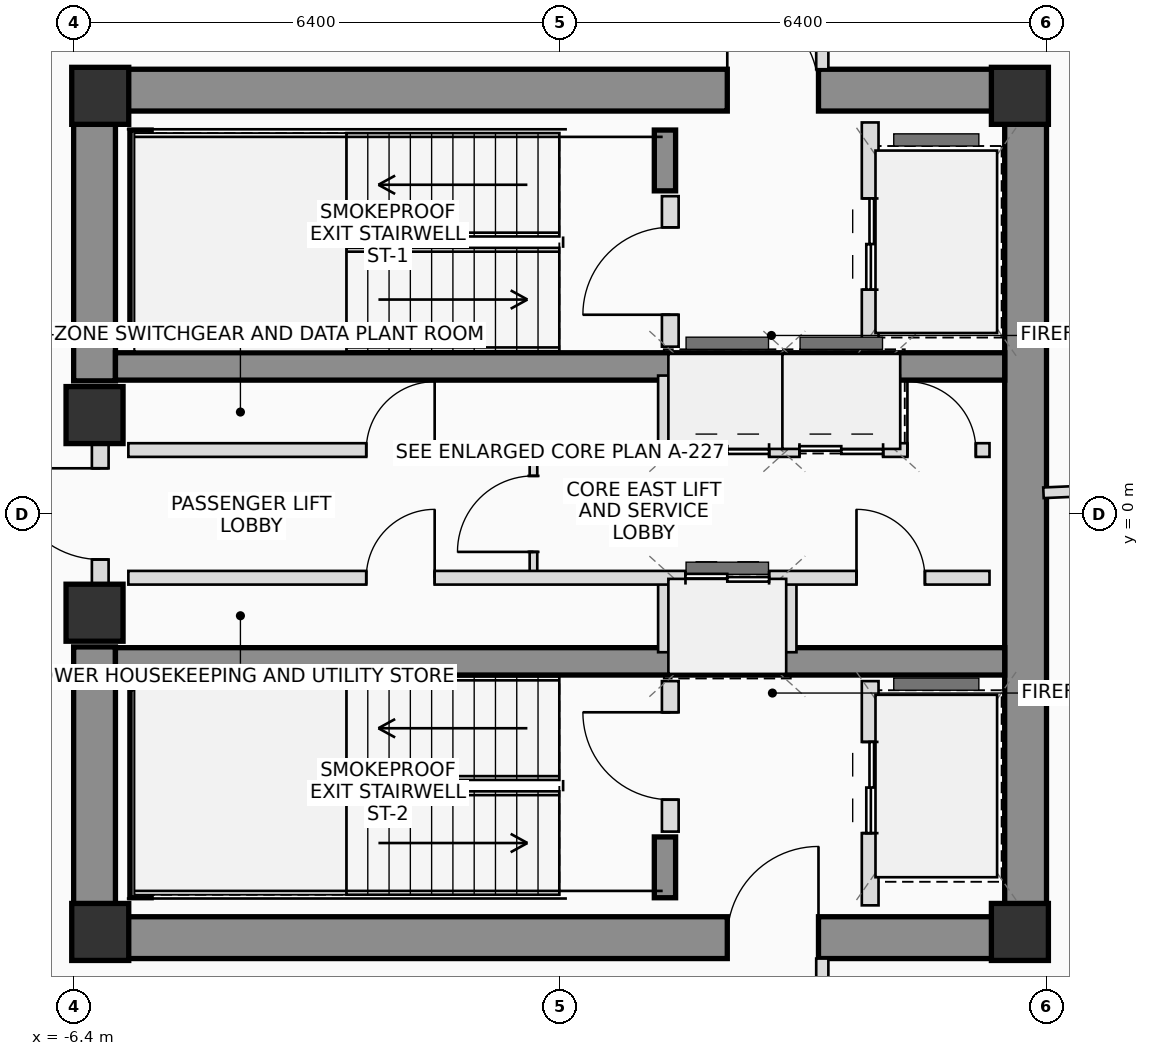
"""IFC4 building model, lengths in metres.
Left out: names, types, materials, properties, quantities, classifications, styles, units other than length and angle.
Written with IfcOpenShell. Run it as: python <this file> out.ifc"""

import sys

from ifc_helpers import new_model, si_unit, direction, frame, frame_2d, origin, origin_2d, place, context, subcontext, project, spatial, rectangle, extrude, source, transform, mapped, element, fill, save


model = new_model("IFC4")
c1 = context("Model", 3, precision=1e-05, world=origin(), true_north=direction((0.0, 1.0)))
c2 = subcontext(c1, "Body", "Model", "MODEL_VIEW")
j1 = project(units=[si_unit("LENGTHUNIT", "METRE"), si_unit("PLANEANGLEUNIT", "RADIAN")], contexts=[c1])
p1 = place(None, origin())
s1 = spatial("IfcSite", under=j1, at=p1, CompositionType="ELEMENT")
p2 = place(p1, origin())
s2 = spatial("IfcBuilding", under=s1, at=p2, CompositionType="ELEMENT")
p3 = place(p2, frame((0.0, 0.0, 303.65)))
s3 = spatial("IfcBuildingStorey", under=s2, at=p3, CompositionType="ELEMENT", Elevation=303.65)
m1 = source(origin(), c2, "Body", "SweptSolid", [
    extrude(rectangle(XDim=0.75, YDim=0.75, at=origin_2d()), origin(), (0.0, 0.0, 1.0), 3.45),
])
for number, where, z_axis, x_axis in (
    (1, (-6.05, -5.5, 0.0), (0.0, 0.0, 1.0), (1.0, 0.0, 0.0)),
    (2, (6.05, -5.5, 0.0), (0.0, 0.0, 1.0), (1.0, 0.0, 0.0)),
    (3, (6.05, 5.5, 0.0), (0.0, 0.0, 1.0), (1.0, 0.0, 0.0)),
    (4, (-6.05, 5.5, 0.0), (0.0, 0.0, 1.0), (1.0, 0.0, 0.0)),
):
    element("IfcColumn", number, at=place(p3, frame(where, z_axis=z_axis, x_axis=x_axis)), inside=s3, PredefinedType="COLUMN", context=c2, shape_type="MappedRepresentation", body=[
        mapped(m1, transform((0.0, 0.0, 0.0), scale=1.0)),
    ])
p4 = place(p3, frame((-6.4, 5.575, 0.0), z_axis=(0.0, 0.0, 1.0), x_axis=(1.0, 0.0, 0.0)))
e5 = element("IfcWall", 5, at=p4, inside=s3, PredefinedType="SHEAR", context=c2, shape_type="SweptSolid", body=[
    extrude(rectangle(XDim=12.8, YDim=0.55, at=frame_2d((6.4, 0.0))), origin(), (0.0, 0.0, 1.0), 3.45),
])
p5 = place(p4, frame((8.6, 0.0, 0.0)))
e6 = element("IfcOpeningElement", 6, at=p5, cuts=e5, PredefinedType="OPENING", context=c2, shape_type="SweptSolid", body=[
    extrude(rectangle(XDim=1.2, YDim=2.2, at=frame_2d((0.6, 1.1))), frame((0.0, 0.285, 0.0), z_axis=(0.0, -1.0, 0.0), x_axis=(1.0, 0.0, 0.0)), (0.0, 0.0, 1.0), 0.57),
])
p6 = place(p3, frame((-6.4, -5.575, 0.0), z_axis=(0.0, 0.0, 1.0), x_axis=(1.0, 0.0, 0.0)))
e7 = element("IfcWall", 7, at=p6, inside=s3, PredefinedType="SHEAR", context=c2, shape_type="SweptSolid", body=[
    extrude(rectangle(XDim=12.8, YDim=0.55, at=frame_2d((6.4, 0.0))), origin(), (0.0, 0.0, 1.0), 3.45),
])
p7 = place(p6, frame((8.6, 0.0, 0.0)))
e8 = element("IfcOpeningElement", 8, at=p7, cuts=e7, PredefinedType="OPENING", context=c2, shape_type="SweptSolid", body=[
    extrude(rectangle(XDim=1.2, YDim=2.2, at=frame_2d((0.6, 1.1))), frame((0.0, 0.285, 0.0), z_axis=(0.0, -1.0, 0.0), x_axis=(1.0, 0.0, 0.0)), (0.0, 0.0, 1.0), 0.57),
])
p8 = place(p3, frame((6.125, -5.3, 0.0), z_axis=(0.0, 0.0, 1.0), x_axis=(0.0, 1.0, 0.0)))
e9 = element("IfcWall", 9, at=p8, inside=s3, PredefinedType="SHEAR", context=c2, shape_type="SweptSolid", body=[
    extrude(rectangle(XDim=10.6, YDim=0.55, at=frame_2d((5.3, 0.0))), origin(), (0.0, 0.0, 1.0), 3.45),
])
for number, where, z_axis, x_axis in (
    (10, (-6.125, -5.3, 0.0), (0.0, 0.0, 1.0), (0.0, 1.0, 0.0)),
    (11, (-6.125, 1.75, 0.0), (0.0, 0.0, 1.0), (0.0, 1.0, 0.0)),
):
    element("IfcWall", number, at=place(p3, frame(where, z_axis=z_axis, x_axis=x_axis)), inside=s3, PredefinedType="SHEAR", context=c2, shape_type="SweptSolid", body=[
        extrude(rectangle(XDim=3.55, YDim=0.55, at=frame_2d((1.775, 0.0))), origin(), (0.0, 0.0, 1.0), 3.45),
    ])
for number, where, z_axis, x_axis in (
    (12, (-5.85, 1.94, 0.0), (0.0, 0.0, 1.0), (1.0, 0.0, 0.0)),
    (13, (-5.85, -1.94, 0.0), (0.0, 0.0, 1.0), (1.0, 0.0, 0.0)),
):
    element("IfcWall", number, at=place(p3, frame(where, z_axis=z_axis, x_axis=x_axis)), inside=s3, PredefinedType="SHEAR", context=c2, shape_type="SweptSolid", body=[
        extrude(rectangle(XDim=11.7, YDim=0.36, at=frame_2d((5.85, 0.0))), origin(), (0.0, 0.0, 1.0), 3.45),
    ])
p9 = place(p3, frame((-5.52, 2.3, 0.0), z_axis=(0.0, 0.0, 1.0), x_axis=(0.0, 1.0, 0.0)))
e14 = element("IfcWall", 14, at=p9, inside=s3, PredefinedType="SHEAR", context=c2, shape_type="SweptSolid", body=[
    extrude(rectangle(XDim=2.75, YDim=0.28, at=frame_2d((1.375, 0.0))), origin(), (0.0, 0.0, 1.0), 3.45),
])
p10 = place(p3, frame((1.38, 4.25, 0.0), z_axis=(0.0, 0.0, 1.0), x_axis=(0.0, 1.0, 0.0)))
e15 = element("IfcWall", 15, at=p10, inside=s3, PredefinedType="SHEAR", context=c2, shape_type="SweptSolid", body=[
    extrude(rectangle(XDim=0.8, YDim=0.28, at=frame_2d((0.4, 0.0))), origin(), (0.0, 0.0, 1.0), 3.45),
])
p11 = place(p3, frame((-5.52, -5.05, 0.0), z_axis=(0.0, 0.0, 1.0), x_axis=(0.0, 1.0, 0.0)))
e16 = element("IfcWall", 16, at=p11, inside=s3, PredefinedType="SHEAR", context=c2, shape_type="SweptSolid", body=[
    extrude(rectangle(XDim=2.75, YDim=0.28, at=frame_2d((1.375, 0.0))), origin(), (0.0, 0.0, 1.0), 3.45),
])
p12 = place(p3, frame((1.38, -5.05, 0.0), z_axis=(0.0, 0.0, 1.0), x_axis=(0.0, 1.0, 0.0)))
e17 = element("IfcWall", 17, at=p12, inside=s3, PredefinedType="SHEAR", context=c2, shape_type="SweptSolid", body=[
    extrude(rectangle(XDim=0.8, YDim=0.28, at=frame_2d((0.4, 0.0))), origin(), (0.0, 0.0, 1.0), 3.45),
])
for number, where, z_axis, x_axis in (
    (18, (-6.125, -1.3, 0.0), (0.0, 0.0, 1.0), (1.0, 0.0, 0.0)),
    (19, (-6.125, 1.3, 0.0), (0.0, 0.0, 1.0), (1.0, 0.0, 0.0)),
):
    element("IfcColumn", number, at=place(p3, frame(where, z_axis=z_axis, x_axis=x_axis)), inside=s3, PredefinedType="COLUMN", context=c2, shape_type="MappedRepresentation", body=[
        mapped(m1, transform((0.0, 0.0, 0.0), scale=1.0)),
    ])
p13 = place(p3, frame((-6.05, -0.95, 0.0), z_axis=(0.0, 0.0, 1.0), x_axis=(0.0, 1.0, 0.0)))
e20 = element("IfcWall", 20, at=p13, inside=s3, PredefinedType="PLUMBINGWALL", context=c2, shape_type="SweptSolid", body=[
    extrude(rectangle(XDim=1.9, YDim=0.22, at=frame_2d((0.95, 0.0))), origin(), (0.0, 0.0, 1.0), 2.23),
])
p14 = place(p13, frame((0.35, 0.0, 0.0)))
e21 = element("IfcOpeningElement", 21, at=p14, cuts=e20, PredefinedType="OPENING", context=c2, shape_type="SweptSolid", body=[
    extrude(rectangle(XDim=1.2, YDim=2.2, at=frame_2d((0.6, 1.1))), frame((0.0, 0.12, 0.0), z_axis=(0.0, -1.0, 0.0), x_axis=(1.0, 0.0, 0.0)), (0.0, 0.0, 1.0), 0.24),
])
p15 = place(p3, frame((1.45, 2.2, 0.0), z_axis=(0.0, 0.0, 1.0), x_axis=(0.0, 1.0, 0.0)))
e22 = element("IfcWall", 22, at=p15, inside=s3, PredefinedType="PLUMBINGWALL", context=c2, shape_type="SweptSolid", body=[
    extrude(rectangle(XDim=1.98, YDim=0.22, at=frame_2d((0.99, 0.0))), origin(), (0.0, 0.0, 1.0), 3.25),
])
p16 = place(p15, frame((0.42, 0.0, 0.0)))
e23 = element("IfcOpeningElement", 23, at=p16, cuts=e22, PredefinedType="OPENING", context=c2, shape_type="SweptSolid", body=[
    extrude(rectangle(XDim=1.15, YDim=2.15, at=frame_2d((0.575, 1.075))), frame((0.0, 0.12, 0.0), z_axis=(0.0, -1.0, 0.0), x_axis=(1.0, 0.0, 0.0)), (0.0, 0.0, 1.0), 0.24),
])
p17 = place(p3, frame((4.08, 2.2, 0.0), z_axis=(0.0, 0.0, 1.0), x_axis=(0.0, 1.0, 0.0)))
e24 = element("IfcWall", 24, at=p17, inside=s3, PredefinedType="PLUMBINGWALL", context=c2, shape_type="SweptSolid", body=[
    extrude(rectangle(XDim=2.95, YDim=0.22, at=frame_2d((1.475, 0.0))), origin(), (0.0, 0.0, 1.0), 3.25),
])
p18 = place(p17, frame((0.75, 0.0, 0.0)))
e25 = element("IfcOpeningElement", 25, at=p18, cuts=e24, PredefinedType="OPENING", context=c2, shape_type="SweptSolid", body=[
    extrude(rectangle(XDim=1.2, YDim=2.25, at=frame_2d((0.6, 1.125))), frame((0.0, 0.12, 0.0), z_axis=(0.0, -1.0, 0.0), x_axis=(1.0, 0.0, 0.0)), (0.0, 0.0, 1.0), 0.24),
])
p19 = place(p3, frame((1.45, -4.18, 0.0), z_axis=(0.0, 0.0, 1.0), x_axis=(0.0, 1.0, 0.0)))
e26 = element("IfcWall", 26, at=p19, inside=s3, PredefinedType="PLUMBINGWALL", context=c2, shape_type="SweptSolid", body=[
    extrude(rectangle(XDim=1.98, YDim=0.22, at=frame_2d((0.99, 0.0))), origin(), (0.0, 0.0, 1.0), 3.25),
])
p20 = place(p19, frame((0.42, 0.0, 0.0)))
e27 = element("IfcOpeningElement", 27, at=p20, cuts=e26, PredefinedType="OPENING", context=c2, shape_type="SweptSolid", body=[
    extrude(rectangle(XDim=1.15, YDim=2.15, at=frame_2d((0.575, 1.075))), frame((0.0, 0.12, 0.0), z_axis=(0.0, -1.0, 0.0), x_axis=(1.0, 0.0, 0.0)), (0.0, 0.0, 1.0), 0.24),
])
p21 = place(p3, frame((4.08, -5.15, 0.0), z_axis=(0.0, 0.0, 1.0), x_axis=(0.0, 1.0, 0.0)))
e28 = element("IfcWall", 28, at=p21, inside=s3, PredefinedType="PLUMBINGWALL", context=c2, shape_type="SweptSolid", body=[
    extrude(rectangle(XDim=2.95, YDim=0.22, at=frame_2d((1.475, 0.0))), origin(), (0.0, 0.0, 1.0), 3.25),
])
p22 = place(p21, frame((0.95, 0.0, 0.0)))
e29 = element("IfcOpeningElement", 29, at=p22, cuts=e28, PredefinedType="OPENING", context=c2, shape_type="SweptSolid", body=[
    extrude(rectangle(XDim=1.2, YDim=2.25, at=frame_2d((0.6, 1.125))), frame((0.0, 0.12, 0.0), z_axis=(0.0, -1.0, 0.0), x_axis=(1.0, 0.0, 0.0)), (0.0, 0.0, 1.0), 0.24),
])
p23 = place(p3, frame((-0.35, -0.84, 0.0), z_axis=(0.0, 0.0, 1.0), x_axis=(0.0, 1.0, 0.0)))
e30 = element("IfcWall", 30, at=p23, inside=s3, PredefinedType="PARTITIONING", context=c2, shape_type="SweptSolid", body=[
    extrude(rectangle(XDim=1.68, YDim=0.1, at=frame_2d((0.84, 0.0))), origin(), (0.0, 0.0, 1.0), 3.25),
])
p24 = place(p23, frame((0.34, 0.0, 0.0)))
e31 = element("IfcOpeningElement", 31, at=p24, cuts=e30, PredefinedType="OPENING", context=c2, shape_type="SweptSolid", body=[
    extrude(rectangle(XDim=1.0, YDim=2.25, at=frame_2d((0.5, 1.125))), frame((0.0, 0.06, 0.0), z_axis=(0.0, -1.0, 0.0), x_axis=(1.0, 0.0, 0.0)), (0.0, 0.0, 1.0), 0.12),
])
for number, where, z_axis, x_axis in (
    (32, (1.38, 0.84, 0.0), (0.0, 0.0, 1.0), (0.0, 1.0, 0.0)),
    (33, (1.38, -1.82, 0.0), (0.0, 0.0, 1.0), (0.0, 1.0, 0.0)),
    (34, (3.02, 0.84, 0.0), (0.0, 0.0, 1.0), (0.0, 1.0, 0.0)),
    (35, (4.38, 0.84, 0.0), (0.0, 0.0, 1.0), (0.0, 1.0, 0.0)),
    (36, (3.02, -1.82, 0.0), (0.0, 0.0, 1.0), (0.0, 1.0, 0.0)),
):
    element("IfcWall", number, at=place(p3, frame(where, z_axis=z_axis, x_axis=x_axis)), inside=s3, PredefinedType="PLUMBINGWALL", context=c2, shape_type="SweptSolid", body=[
        extrude(rectangle(XDim=0.98, YDim=0.18, at=frame_2d((0.49, 0.0))), origin(), (0.0, 0.0, 1.0), 3.25),
    ])
p25 = place(p3, frame((-5.68, 0.84, 0.0), z_axis=(0.0, 0.0, 1.0), x_axis=(1.0, 0.0, 0.0)))
e37 = element("IfcWall", 37, at=p25, inside=s3, PredefinedType="PLUMBINGWALL", context=c2, shape_type="SweptSolid", body=[
    extrude(rectangle(XDim=11.33, YDim=0.18, at=frame_2d((5.665, 0.0))), origin(), (0.0, 0.0, 1.0), 3.25),
])
p26 = place(p25, frame((3.13, 0.0, 0.0)))
e38 = element("IfcOpeningElement", 38, at=p26, cuts=e37, PredefinedType="OPENING", context=c2, shape_type="SweptSolid", body=[
    extrude(rectangle(XDim=0.9, YDim=2.05, at=frame_2d((0.45, 1.025))), frame((0.0, 0.1, 0.0), z_axis=(0.0, -1.0, 0.0), x_axis=(1.0, 0.0, 0.0)), (0.0, 0.0, 1.0), 0.2),
])
p27 = place(p25, frame((7.33, 0.0, 0.0)))
e39 = element("IfcOpeningElement", 39, at=p27, cuts=e37, PredefinedType="OPENING", context=c2, shape_type="SweptSolid", body=[
    extrude(rectangle(XDim=1.1, YDim=2.2, at=frame_2d((0.55, 1.1))), frame((0.0, 0.1, 0.0), z_axis=(0.0, -1.0, 0.0), x_axis=(1.0, 0.0, 0.0)), (0.0, 0.0, 1.0), 0.2),
])
p28 = place(p25, frame((8.83, 0.0, 0.0)))
e40 = element("IfcOpeningElement", 40, at=p28, cuts=e37, PredefinedType="OPENING", context=c2, shape_type="SweptSolid", body=[
    extrude(rectangle(XDim=1.1, YDim=2.2, at=frame_2d((0.55, 1.1))), frame((0.0, 0.1, 0.0), z_axis=(0.0, -1.0, 0.0), x_axis=(1.0, 0.0, 0.0)), (0.0, 0.0, 1.0), 0.2),
])
p29 = place(p25, frame((10.25, 0.0, 0.0)))
e41 = element("IfcOpeningElement", 41, at=p29, cuts=e37, PredefinedType="OPENING", context=c2, shape_type="SweptSolid", body=[
    extrude(rectangle(XDim=0.9, YDim=2.05, at=frame_2d((0.45, 1.025))), frame((0.0, 0.1, 0.0), z_axis=(0.0, -1.0, 0.0), x_axis=(1.0, 0.0, 0.0)), (0.0, 0.0, 1.0), 0.2),
])
p30 = place(p3, frame((-5.68, -0.84, 0.0), z_axis=(0.0, 0.0, 1.0), x_axis=(1.0, 0.0, 0.0)))
e42 = element("IfcWall", 42, at=p30, inside=s3, PredefinedType="PLUMBINGWALL", context=c2, shape_type="SweptSolid", body=[
    extrude(rectangle(XDim=11.33, YDim=0.18, at=frame_2d((5.665, 0.0))), origin(), (0.0, 0.0, 1.0), 3.25),
])
p31 = place(p30, frame((3.13, 0.0, 0.0)))
e43 = element("IfcOpeningElement", 43, at=p31, cuts=e42, PredefinedType="OPENING", context=c2, shape_type="SweptSolid", body=[
    extrude(rectangle(XDim=0.9, YDim=2.05, at=frame_2d((0.45, 1.025))), frame((0.0, 0.1, 0.0), z_axis=(0.0, -1.0, 0.0), x_axis=(1.0, 0.0, 0.0)), (0.0, 0.0, 1.0), 0.2),
])
p32 = place(p30, frame((7.33, 0.0, 0.0)))
e44 = element("IfcOpeningElement", 44, at=p32, cuts=e42, PredefinedType="OPENING", context=c2, shape_type="SweptSolid", body=[
    extrude(rectangle(XDim=1.1, YDim=2.2, at=frame_2d((0.55, 1.1))), frame((0.0, 0.1, 0.0), z_axis=(0.0, -1.0, 0.0), x_axis=(1.0, 0.0, 0.0)), (0.0, 0.0, 1.0), 0.2),
])
p33 = place(p30, frame((9.58, 0.0, 0.0)))
e45 = element("IfcOpeningElement", 45, at=p33, cuts=e42, PredefinedType="OPENING", context=c2, shape_type="SweptSolid", body=[
    extrude(rectangle(XDim=0.9, YDim=2.05, at=frame_2d((0.45, 1.025))), frame((0.0, 0.1, 0.0), z_axis=(0.0, -1.0, 0.0), x_axis=(1.0, 0.0, 0.0)), (0.0, 0.0, 1.0), 0.2),
])
p34 = place(p3, frame((3.45, 7.425, 0.0), z_axis=(0.0, 0.0, 1.0), x_axis=(0.0, -1.0, 0.0)))
e46 = element("IfcWall", 46, at=p34, inside=s3, PredefinedType="PARTITIONING", context=c2, shape_type="SweptSolid", body=[
    extrude(rectangle(XDim=1.575, YDim=0.16, at=frame_2d((0.787, 0.0))), origin(), (0.0, 0.0, 1.0), 2.855),
])
p35 = place(p34, frame((0.287, 0.0, 0.0)))
e47 = element("IfcOpeningElement", 47, at=p35, cuts=e46, PredefinedType="OPENING", context=c2, shape_type="SweptSolid", body=[
    extrude(rectangle(XDim=1.0, YDim=2.25, at=frame_2d((0.5, 1.125))), frame((0.0, 0.09, 0.0), z_axis=(0.0, -1.0, 0.0), x_axis=(1.0, 0.0, 0.0)), (0.0, 0.0, 1.0), 0.18),
])
p36 = place(p3, frame((3.45, -5.85, 0.0), z_axis=(0.0, 0.0, 1.0), x_axis=(0.0, -1.0, 0.0)))
e48 = element("IfcWall", 48, at=p36, inside=s3, PredefinedType="PARTITIONING", context=c2, shape_type="SweptSolid", body=[
    extrude(rectangle(XDim=1.575, YDim=0.16, at=frame_2d((0.787, 0.0))), origin(), (0.0, 0.0, 1.0), 2.855),
])
p37 = place(p36, frame((0.287, 0.0, 0.0)))
e49 = element("IfcOpeningElement", 49, at=p37, cuts=e48, PredefinedType="OPENING", context=c2, shape_type="SweptSolid", body=[
    extrude(rectangle(XDim=1.0, YDim=2.25, at=frame_2d((0.5, 1.125))), frame((0.0, 0.09, 0.0), z_axis=(0.0, -1.0, 0.0), x_axis=(1.0, 0.0, 0.0)), (0.0, 0.0, 1.0), 0.18),
])
p38 = place(p3, frame((6.36, 0.278, 0.0), z_axis=(0.0, 0.0, 1.0), x_axis=(0.999047623791, 0.043633076864, 0.0)))
e50 = element("IfcWall", 50, at=p38, inside=s3, PredefinedType="PARTITIONING", context=c2, shape_type="SweptSolid", body=[
    extrude(rectangle(XDim=13.524, YDim=0.14, at=frame_2d((6.762, 0.0))), origin(), (0.0, 0.0, 1.0), 2.815),
])
p39 = place(p5, origin())
e51 = element("IfcDoor", 51, at=p39, inside=s3, OperationType="SINGLE_SWING_LEFT", PredefinedType="DOOR", context=c2, shape_type="SweptSolid", body=[
    extrude(rectangle(XDim=1.2, YDim=2.2, at=frame_2d((0.6, 1.1))), frame((0.0, 0.025, 0.0), z_axis=(0.0, -1.0, 0.0), x_axis=(1.0, 0.0, 0.0)), (0.0, 0.0, 1.0), 0.05),
])
fill(e6, e51)
p40 = place(p7, origin())
e52 = element("IfcDoor", 52, at=p40, inside=s3, OperationType="SINGLE_SWING_RIGHT", PredefinedType="DOOR", context=c2, shape_type="SweptSolid", body=[
    extrude(rectangle(XDim=1.2, YDim=2.2, at=frame_2d((0.6, 1.1))), frame((0.0, 0.025, 0.0), z_axis=(0.0, -1.0, 0.0), x_axis=(1.0, 0.0, 0.0)), (0.0, 0.0, 1.0), 0.05),
])
fill(e8, e52)
p41 = place(p14, origin())
e53 = element("IfcDoor", 53, at=p41, inside=s3, OperationType="SINGLE_SWING_RIGHT", PredefinedType="DOOR", context=c2, shape_type="SweptSolid", body=[
    extrude(rectangle(XDim=1.2, YDim=2.2, at=frame_2d((0.6, 1.1))), frame((0.0, 0.025, 0.0), z_axis=(0.0, -1.0, 0.0), x_axis=(1.0, 0.0, 0.0)), (0.0, 0.0, 1.0), 0.05),
])
fill(e21, e53)
p42 = place(p16, origin())
e54 = element("IfcDoor", 54, at=p42, inside=s3, OperationType="SINGLE_SWING_LEFT", PredefinedType="DOOR", context=c2, shape_type="SweptSolid", body=[
    extrude(rectangle(XDim=1.15, YDim=2.15, at=frame_2d((0.575, 1.075))), frame((0.0, 0.025, 0.0), z_axis=(0.0, -1.0, 0.0), x_axis=(1.0, 0.0, 0.0)), (0.0, 0.0, 1.0), 0.05),
])
fill(e23, e54)
p43 = place(p18, origin())
e55 = element("IfcDoor", 55, at=p43, inside=s3, OperationType="DOUBLE_DOOR_SLIDING", PredefinedType="DOOR", context=c2, shape_type="SweptSolid", body=[
    extrude(rectangle(XDim=1.2, YDim=2.25, at=frame_2d((0.6, 1.125))), frame((0.0, 0.025, 0.0), z_axis=(0.0, -1.0, 0.0), x_axis=(1.0, 0.0, 0.0)), (0.0, 0.0, 1.0), 0.05),
])
fill(e25, e55)
p44 = place(p20, origin())
e56 = element("IfcDoor", 56, at=p44, inside=s3, OperationType="SINGLE_SWING_RIGHT", PredefinedType="DOOR", context=c2, shape_type="SweptSolid", body=[
    extrude(rectangle(XDim=1.15, YDim=2.15, at=frame_2d((0.575, 1.075))), frame((0.0, 0.025, 0.0), z_axis=(0.0, -1.0, 0.0), x_axis=(1.0, 0.0, 0.0)), (0.0, 0.0, 1.0), 0.05),
])
fill(e27, e56)
p45 = place(p22, origin())
e57 = element("IfcDoor", 57, at=p45, inside=s3, OperationType="DOUBLE_DOOR_SLIDING", PredefinedType="DOOR", context=c2, shape_type="SweptSolid", body=[
    extrude(rectangle(XDim=1.2, YDim=2.25, at=frame_2d((0.6, 1.125))), frame((0.0, 0.025, 0.0), z_axis=(0.0, -1.0, 0.0), x_axis=(1.0, 0.0, 0.0)), (0.0, 0.0, 1.0), 0.05),
])
fill(e29, e57)
p46 = place(p24, origin())
e58 = element("IfcDoor", 58, at=p46, inside=s3, OperationType="SINGLE_SWING_LEFT", PredefinedType="DOOR", context=c2, shape_type="SweptSolid", body=[
    extrude(rectangle(XDim=1.0, YDim=2.25, at=frame_2d((0.5, 1.125))), frame((0.0, 0.025, 0.0), z_axis=(0.0, -1.0, 0.0), x_axis=(1.0, 0.0, 0.0)), (0.0, 0.0, 1.0), 0.05),
])
fill(e31, e58)
p47 = place(p26, origin())
e59 = element("IfcDoor", 59, at=p47, inside=s3, OperationType="SINGLE_SWING_RIGHT", PredefinedType="DOOR", context=c2, shape_type="SweptSolid", body=[
    extrude(rectangle(XDim=0.9, YDim=2.05, at=frame_2d((0.45, 1.025))), frame((0.0, 0.025, 0.0), z_axis=(0.0, -1.0, 0.0), x_axis=(1.0, 0.0, 0.0)), (0.0, 0.0, 1.0), 0.05),
])
fill(e38, e59)
p48 = place(p27, origin())
e60 = element("IfcDoor", 60, at=p48, inside=s3, OperationType="DOUBLE_DOOR_SLIDING", PredefinedType="DOOR", context=c2, shape_type="SweptSolid", body=[
    extrude(rectangle(XDim=1.1, YDim=2.2, at=frame_2d((0.55, 1.1))), frame((0.0, 0.025, 0.0), z_axis=(0.0, -1.0, 0.0), x_axis=(1.0, 0.0, 0.0)), (0.0, 0.0, 1.0), 0.05),
])
fill(e39, e60)
p49 = place(p28, origin())
e61 = element("IfcDoor", 61, at=p49, inside=s3, OperationType="DOUBLE_DOOR_SLIDING", PredefinedType="DOOR", context=c2, shape_type="SweptSolid", body=[
    extrude(rectangle(XDim=1.1, YDim=2.2, at=frame_2d((0.55, 1.1))), frame((0.0, 0.025, 0.0), z_axis=(0.0, -1.0, 0.0), x_axis=(1.0, 0.0, 0.0)), (0.0, 0.0, 1.0), 0.05),
])
fill(e40, e61)
p50 = place(p29, origin())
e62 = element("IfcDoor", 62, at=p50, inside=s3, OperationType="SINGLE_SWING_LEFT", PredefinedType="DOOR", context=c2, shape_type="SweptSolid", body=[
    extrude(rectangle(XDim=0.9, YDim=2.05, at=frame_2d((0.45, 1.025))), frame((0.0, 0.025, 0.0), z_axis=(0.0, -1.0, 0.0), x_axis=(1.0, 0.0, 0.0)), (0.0, 0.0, 1.0), 0.05),
])
fill(e41, e62)
p51 = place(p31, origin())
e63 = element("IfcDoor", 63, at=p51, inside=s3, OperationType="SINGLE_SWING_RIGHT", PredefinedType="DOOR", context=c2, shape_type="SweptSolid", body=[
    extrude(rectangle(XDim=0.9, YDim=2.05, at=frame_2d((0.45, 1.025))), frame((0.0, 0.025, 0.0), z_axis=(0.0, -1.0, 0.0), x_axis=(1.0, 0.0, 0.0)), (0.0, 0.0, 1.0), 0.05),
])
fill(e43, e63)
p52 = place(p32, origin())
e64 = element("IfcDoor", 64, at=p52, inside=s3, OperationType="DOUBLE_DOOR_SLIDING", PredefinedType="DOOR", context=c2, shape_type="SweptSolid", body=[
    extrude(rectangle(XDim=1.1, YDim=2.2, at=frame_2d((0.55, 1.1))), frame((0.0, 0.025, 0.0), z_axis=(0.0, -1.0, 0.0), x_axis=(1.0, 0.0, 0.0)), (0.0, 0.0, 1.0), 0.05),
])
fill(e44, e64)
p53 = place(p33, origin())
e65 = element("IfcDoor", 65, at=p53, inside=s3, OperationType="SINGLE_SWING_LEFT", PredefinedType="DOOR", context=c2, shape_type="SweptSolid", body=[
    extrude(rectangle(XDim=0.9, YDim=2.05, at=frame_2d((0.45, 1.025))), frame((0.0, 0.025, 0.0), z_axis=(0.0, -1.0, 0.0), x_axis=(1.0, 0.0, 0.0)), (0.0, 0.0, 1.0), 0.05),
])
fill(e45, e65)
save(model, sys.argv[1])
